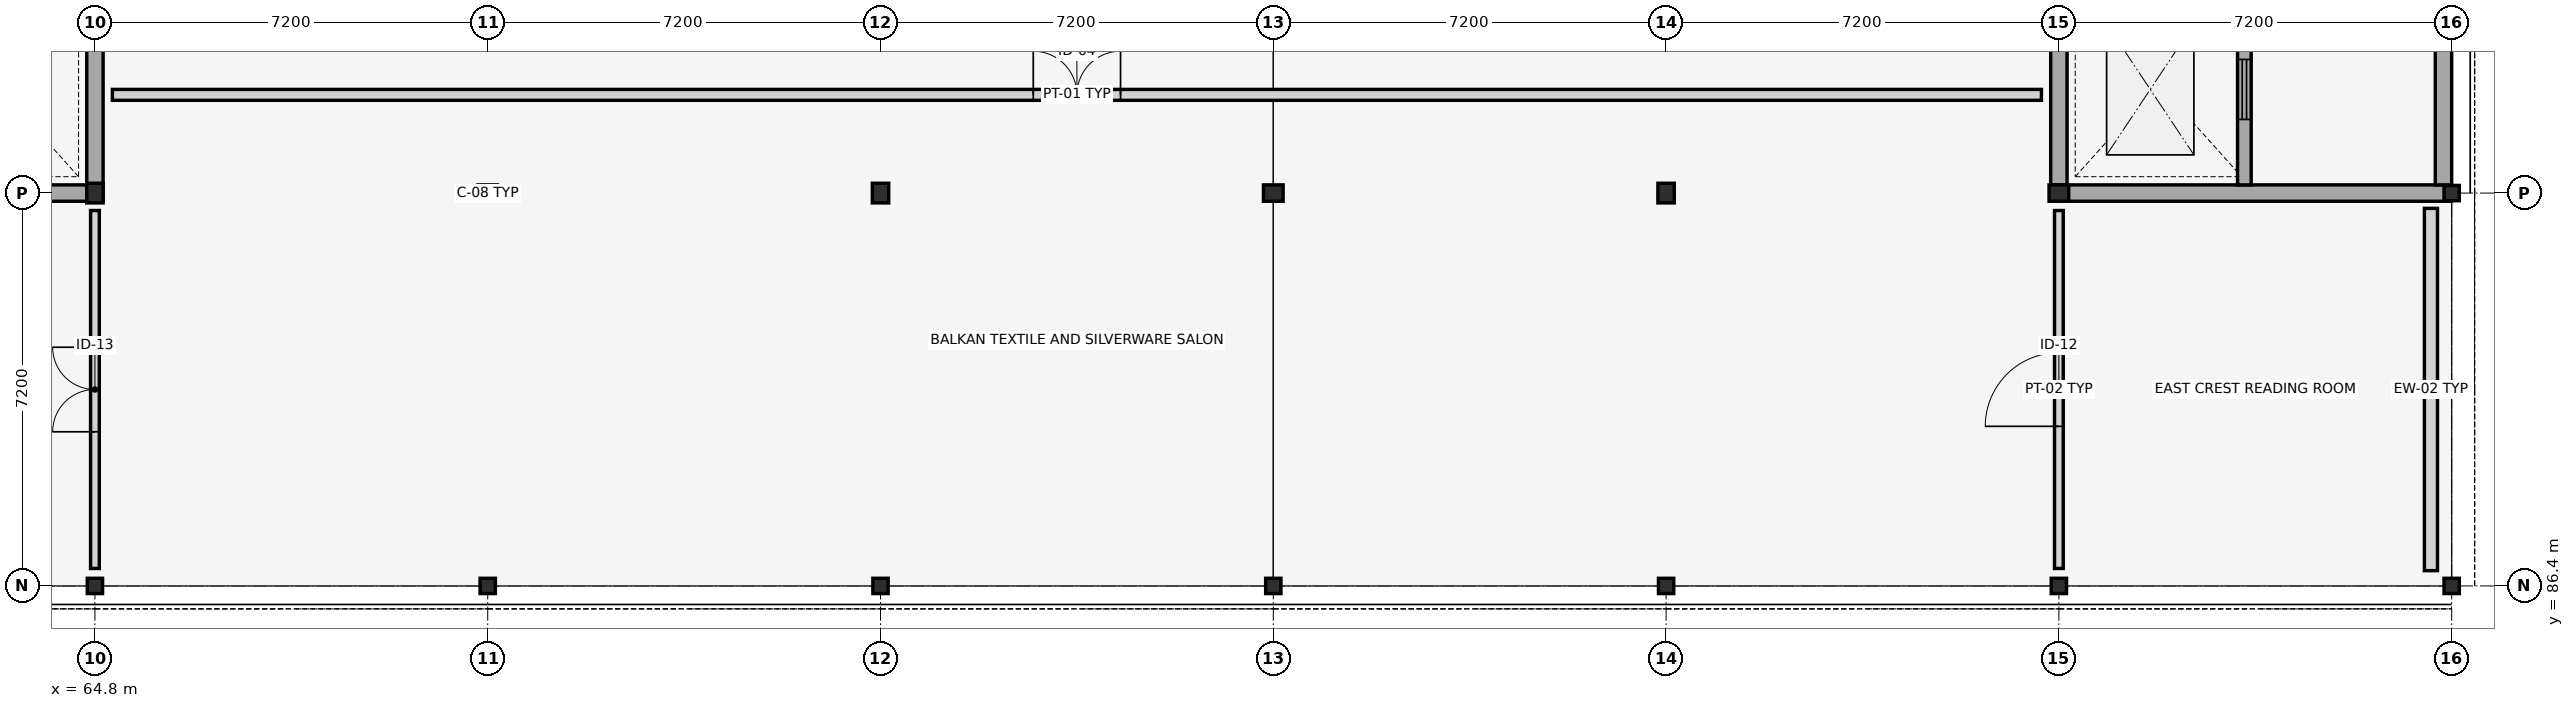
"""IFC4 building model, lengths in metres.
Left out: names, types, materials, properties, quantities, classifications, styles, units other than length and angle.
Written with IfcOpenShell. Run it as: python <this file> out.ifc"""

import sys

from ifc_helpers import new_model, si_unit, direction, frame, frame_2d, origin, origin_2d, place, context, subcontext, project, spatial, rectangle, i_section, extrude, element, fill, save


model = new_model("IFC4")
c1 = context("Model", 3, precision=1e-05, world=origin(), true_north=direction((0.0, 1.0)))
c2 = subcontext(c1, "Body", "Model", "MODEL_VIEW")
j1 = project(units=[si_unit("LENGTHUNIT", "METRE"), si_unit("PLANEANGLEUNIT", "RADIAN")], contexts=[c1])
p1 = place(None, origin())
s1 = spatial("IfcSite", under=j1, at=p1, CompositionType="ELEMENT")
p2 = place(p1, origin())
s2 = spatial("IfcBuilding", under=s1, at=p2, CompositionType="ELEMENT")
p3 = place(p2, frame((0.0, 0.0, 12.9)))
s3 = spatial("IfcBuildingStorey", under=s2, at=p3, CompositionType="ELEMENT", Elevation=12.9)
p4 = place(p3, frame((64.8, 86.4, 0.0), z_axis=(0.0, 0.0, 1.0), x_axis=(0.0, 1.0, 0.0)))
e1 = element("IfcColumn", 1, at=p4, inside=s3, PredefinedType="COLUMN", context=c2, shape_type="SweptSolid", body=[
    extrude(i_section(OverallWidth=0.28, OverallDepth=0.28, WebThickness=0.01, FlangeThickness=0.018, FilletRadius=0.024, at=origin_2d()), origin(), (0.0, 0.0, 1.0), 4.2),
])
p5 = place(p3, frame((64.8, 93.6, 0.0), z_axis=(0.0, 0.0, 1.0), x_axis=(1.0, 0.0, 0.0)))
e2 = element("IfcColumn", 2, at=p5, inside=s3, PredefinedType="COLUMN", context=c2, shape_type="SweptSolid", body=[
    extrude(i_section(OverallWidth=0.3, OverallDepth=0.36, WebThickness=0.012, FlangeThickness=0.022, FilletRadius=0.027, at=origin_2d()), origin(), (0.0, 0.0, 1.0), 4.2),
])
p6 = place(p3, frame((72.0, 86.4, 0.0), z_axis=(0.0, 0.0, 1.0), x_axis=(1.0, 0.0, 0.0)))
e3 = element("IfcColumn", 3, at=p6, inside=s3, PredefinedType="COLUMN", context=c2, shape_type="SweptSolid", body=[
    extrude(i_section(OverallWidth=0.28, OverallDepth=0.28, WebThickness=0.01, FlangeThickness=0.018, FilletRadius=0.024, at=origin_2d()), origin(), (0.0, 0.0, 1.0), 4.2),
])
p7 = place(p3, frame((72.0, 93.6, 0.0), z_axis=(0.0, 0.0, 1.0), x_axis=(0.0, 1.0, 0.0)))
e4 = element("IfcColumn", 4, at=p7, inside=s3, PredefinedType="COLUMN", context=c2, shape_type="SweptSolid", body=[
    extrude(i_section(OverallWidth=0.3, OverallDepth=0.36, WebThickness=0.012, FlangeThickness=0.022, FilletRadius=0.027, at=origin_2d()), origin(), (0.0, 0.0, 1.0), 4.2),
])
p8 = place(p3, frame((79.2, 86.4, 0.0), z_axis=(0.0, 0.0, 1.0), x_axis=(0.0, 1.0, 0.0)))
e5 = element("IfcColumn", 5, at=p8, inside=s3, PredefinedType="COLUMN", context=c2, shape_type="SweptSolid", body=[
    extrude(i_section(OverallWidth=0.28, OverallDepth=0.28, WebThickness=0.01, FlangeThickness=0.018, FilletRadius=0.024, at=origin_2d()), origin(), (0.0, 0.0, 1.0), 4.2),
])
p9 = place(p3, frame((79.2, 93.6, 0.0), z_axis=(0.0, 0.0, 1.0), x_axis=(1.0, 0.0, 0.0)))
e6 = element("IfcColumn", 6, at=p9, inside=s3, PredefinedType="COLUMN", context=c2, shape_type="SweptSolid", body=[
    extrude(i_section(OverallWidth=0.3, OverallDepth=0.36, WebThickness=0.012, FlangeThickness=0.022, FilletRadius=0.027, at=origin_2d()), origin(), (0.0, 0.0, 1.0), 4.2),
])
p10 = place(p3, frame((86.4, 86.4, 0.0), z_axis=(0.0, 0.0, 1.0), x_axis=(1.0, 0.0, 0.0)))
e7 = element("IfcColumn", 7, at=p10, inside=s3, PredefinedType="COLUMN", context=c2, shape_type="SweptSolid", body=[
    extrude(i_section(OverallWidth=0.28, OverallDepth=0.28, WebThickness=0.01, FlangeThickness=0.018, FilletRadius=0.024, at=origin_2d()), origin(), (0.0, 0.0, 1.0), 4.2),
])
p11 = place(p3, frame((86.4, 93.6, 0.0), z_axis=(0.0, 0.0, 1.0), x_axis=(0.0, 1.0, 0.0)))
e8 = element("IfcColumn", 8, at=p11, inside=s3, PredefinedType="COLUMN", context=c2, shape_type="SweptSolid", body=[
    extrude(i_section(OverallWidth=0.3, OverallDepth=0.36, WebThickness=0.012, FlangeThickness=0.022, FilletRadius=0.027, at=origin_2d()), origin(), (0.0, 0.0, 1.0), 4.2),
])
p12 = place(p3, frame((93.6, 86.4, 0.0), z_axis=(0.0, 0.0, 1.0), x_axis=(0.0, 1.0, 0.0)))
e9 = element("IfcColumn", 9, at=p12, inside=s3, PredefinedType="COLUMN", context=c2, shape_type="SweptSolid", body=[
    extrude(i_section(OverallWidth=0.28, OverallDepth=0.28, WebThickness=0.01, FlangeThickness=0.018, FilletRadius=0.024, at=origin_2d()), origin(), (0.0, 0.0, 1.0), 4.2),
])
p13 = place(p3, frame((93.6, 93.6, 0.0), z_axis=(0.0, 0.0, 1.0), x_axis=(1.0, 0.0, 0.0)))
e10 = element("IfcColumn", 10, at=p13, inside=s3, PredefinedType="COLUMN", context=c2, shape_type="SweptSolid", body=[
    extrude(i_section(OverallWidth=0.3, OverallDepth=0.36, WebThickness=0.012, FlangeThickness=0.022, FilletRadius=0.027, at=origin_2d()), origin(), (0.0, 0.0, 1.0), 4.2),
])
p14 = place(p3, frame((100.8, 86.4, 0.0), z_axis=(0.0, 0.0, 1.0), x_axis=(1.0, 0.0, 0.0)))
e11 = element("IfcColumn", 11, at=p14, inside=s3, PredefinedType="COLUMN", context=c2, shape_type="SweptSolid", body=[
    extrude(i_section(OverallWidth=0.28, OverallDepth=0.28, WebThickness=0.01, FlangeThickness=0.018, FilletRadius=0.024, at=origin_2d()), origin(), (0.0, 0.0, 1.0), 4.2),
])
p15 = place(p3, frame((100.8, 93.6, 0.0), z_axis=(0.0, 0.0, 1.0), x_axis=(0.0, 1.0, 0.0)))
e12 = element("IfcColumn", 12, at=p15, inside=s3, PredefinedType="COLUMN", context=c2, shape_type="SweptSolid", body=[
    extrude(i_section(OverallWidth=0.3, OverallDepth=0.36, WebThickness=0.012, FlangeThickness=0.022, FilletRadius=0.027, at=origin_2d()), origin(), (0.0, 0.0, 1.0), 4.2),
])
for number, where, z_axis, x_axis in (
    (13, (108.0, 86.4, 0.0), (0.0, 0.0, 1.0), (0.0, 1.0, 0.0)),
    (14, (108.0, 93.6, 0.0), (0.0, 0.0, 1.0), (1.0, 0.0, 0.0)),
):
    element("IfcColumn", number, at=place(p3, frame(where, z_axis=z_axis, x_axis=x_axis)), inside=s3, PredefinedType="COLUMN", context=c2, shape_type="SweptSolid", body=[
        extrude(i_section(OverallWidth=0.28, OverallDepth=0.28, WebThickness=0.01, FlangeThickness=0.018, FilletRadius=0.024, at=origin_2d()), origin(), (0.0, 0.0, 1.0), 4.2),
    ])
p16 = place(p3, frame((107.62, 86.68, 0.0), z_axis=(0.0, 0.0, 1.0), x_axis=(0.0, 1.0, 0.0)))
e15 = element("IfcWall", 15, at=p16, inside=s3, PredefinedType="STANDARD", context=c2, shape_type="SweptSolid", body=[
    extrude(rectangle(XDim=6.64, YDim=0.24, at=frame_2d((3.32, 0.0))), origin(), (0.0, 0.0, 1.0), 3.56),
])
p17 = place(p3, frame((57.6, 93.6, 0.0), z_axis=(0.0, 0.0, 1.0), x_axis=(1.0, 0.0, 0.0)))
e16 = element("IfcWall", 16, at=p17, inside=s3, PredefinedType="SHEAR", context=c2, shape_type="SweptSolid", body=[
    extrude(rectangle(XDim=7.35, YDim=0.3, at=frame_2d((3.675, 0.0))), origin(), (0.0, 0.0, 1.0), 3.96),
])
p18 = place(p3, frame((64.8, 93.75, 0.0), z_axis=(0.0, 0.0, 1.0), x_axis=(0.0, 1.0, 0.0)))
e17 = element("IfcWall", 17, at=p18, inside=s3, PredefinedType="SHEAR", context=c2, shape_type="SweptSolid", body=[
    extrude(rectangle(XDim=14.1, YDim=0.3, at=frame_2d((7.05, 0.0))), origin(), (0.0, 0.0, 1.0), 3.96),
])
p19 = place(p18, frame((3.55, 0.0, 0.0)))
e18 = element("IfcOpeningElement", 18, at=p19, cuts=e17, PredefinedType="OPENING", context=c2, shape_type="SweptSolid", body=[
    extrude(rectangle(XDim=1.3, YDim=2.2, at=frame_2d((0.65, 1.1))), frame((0.0, 0.16, 0.0), z_axis=(0.0, -1.0, 0.0), x_axis=(1.0, 0.0, 0.0)), (0.0, 0.0, 1.0), 0.32),
])
p20 = place(p18, frame((7.85, 0.0, 0.0)))
e19 = element("IfcOpeningElement", 19, at=p20, cuts=e17, PredefinedType="OPENING", context=c2, shape_type="SweptSolid", body=[
    extrude(rectangle(XDim=1.05, YDim=2.15, at=frame_2d((0.525, 1.075))), frame((0.0, 0.16, 0.0), z_axis=(0.0, -1.0, 0.0), x_axis=(1.0, 0.0, 0.0)), (0.0, 0.0, 1.0), 0.32),
])
p21 = place(p18, frame((10.55, 0.0, 0.0)))
e20 = element("IfcOpeningElement", 20, at=p21, cuts=e17, PredefinedType="OPENING", context=c2, shape_type="SweptSolid", body=[
    extrude(rectangle(XDim=1.0, YDim=2.15, at=frame_2d((0.5, 1.075))), frame((0.0, 0.16, 0.0), z_axis=(0.0, -1.0, 0.0), x_axis=(1.0, 0.0, 0.0)), (0.0, 0.0, 1.0), 0.32),
])
p22 = place(p3, frame((100.65, 93.6, 0.0), z_axis=(0.0, 0.0, 1.0), x_axis=(1.0, 0.0, 0.0)))
e21 = element("IfcWall", 21, at=p22, inside=s3, PredefinedType="SHEAR", context=c2, shape_type="SweptSolid", body=[
    extrude(rectangle(XDim=7.35, YDim=0.3, at=frame_2d((3.675, 0.0))), origin(), (0.0, 0.0, 1.0), 3.96),
])
p23 = place(p3, frame((107.85, 93.75, 0.0), z_axis=(0.0, 0.0, 1.0), x_axis=(0.0, 1.0, 0.0)))
e22 = element("IfcWall", 22, at=p23, inside=s3, PredefinedType="SHEAR", context=c2, shape_type="SweptSolid", body=[
    extrude(rectangle(XDim=14.1, YDim=0.3, at=frame_2d((7.05, 0.0))), origin(), (0.0, 0.0, 1.0), 3.96),
])
p24 = place(p3, frame((100.8, 93.75, 0.0), z_axis=(0.0, 0.0, 1.0), x_axis=(0.0, 1.0, 0.0)))
e23 = element("IfcWall", 23, at=p24, inside=s3, PredefinedType="SHEAR", context=c2, shape_type="SweptSolid", body=[
    extrude(rectangle(XDim=14.1, YDim=0.3, at=frame_2d((7.05, 0.0))), origin(), (0.0, 0.0, 1.0), 3.96),
])
p25 = place(p24, frame((3.55, 0.0, 0.0)))
e24 = element("IfcOpeningElement", 24, at=p25, cuts=e23, PredefinedType="OPENING", context=c2, shape_type="SweptSolid", body=[
    extrude(rectangle(XDim=1.3, YDim=2.2, at=frame_2d((0.65, 1.1))), frame((0.0, 0.16, 0.0), z_axis=(0.0, -1.0, 0.0), x_axis=(1.0, 0.0, 0.0)), (0.0, 0.0, 1.0), 0.32),
])
p26 = place(p24, frame((7.85, 0.0, 0.0)))
e25 = element("IfcOpeningElement", 25, at=p26, cuts=e23, PredefinedType="OPENING", context=c2, shape_type="SweptSolid", body=[
    extrude(rectangle(XDim=1.05, YDim=2.15, at=frame_2d((0.525, 1.075))), frame((0.0, 0.16, 0.0), z_axis=(0.0, -1.0, 0.0), x_axis=(1.0, 0.0, 0.0)), (0.0, 0.0, 1.0), 0.32),
])
p27 = place(p24, frame((10.55, 0.0, 0.0)))
e26 = element("IfcOpeningElement", 26, at=p27, cuts=e23, PredefinedType="OPENING", context=c2, shape_type="SweptSolid", body=[
    extrude(rectangle(XDim=1.0, YDim=2.15, at=frame_2d((0.5, 1.075))), frame((0.0, 0.16, 0.0), z_axis=(0.0, -1.0, 0.0), x_axis=(1.0, 0.0, 0.0)), (0.0, 0.0, 1.0), 0.32),
])
p28 = place(p3, frame((104.2, 93.75, 0.0), z_axis=(0.0, 0.0, 1.0), x_axis=(0.0, 1.0, 0.0)))
e27 = element("IfcWall", 27, at=p28, inside=s3, PredefinedType="SHEAR", context=c2, shape_type="SweptSolid", body=[
    extrude(rectangle(XDim=3.525, YDim=0.25, at=frame_2d((1.762, 0.0))), origin(), (0.0, 0.0, 1.0), 3.96),
])
p29 = place(p28, frame((1.2, 0.0, 0.0)))
e28 = element("IfcOpeningElement", 28, at=p29, cuts=e27, PredefinedType="OPENING", context=c2, shape_type="SweptSolid", body=[
    extrude(rectangle(XDim=1.1, YDim=2.15, at=frame_2d((0.55, 1.075))), frame((0.0, 0.135, 0.0), z_axis=(0.0, -1.0, 0.0), x_axis=(1.0, 0.0, 0.0)), (0.0, 0.0, 1.0), 0.27),
])
p30 = place(p3, frame((65.12, 95.4, 0.0), z_axis=(0.0, 0.0, 1.0), x_axis=(1.0, 0.0, 0.0)))
e29 = element("IfcWall", 29, at=p30, inside=s3, PredefinedType="PARTITIONING", context=c2, shape_type="SweptSolid", body=[
    extrude(rectangle(XDim=35.36, YDim=0.2, at=frame_2d((17.68, 0.0))), origin(), (0.0, 0.0, 1.0), 3.15),
])
p31 = place(p30, frame((16.88, 0.0, 0.0)))
e30 = element("IfcOpeningElement", 30, at=p31, cuts=e29, PredefinedType="OPENING", context=c2, shape_type="SweptSolid", body=[
    extrude(rectangle(XDim=1.6, YDim=2.35, at=frame_2d((0.8, 1.175))), frame((0.0, 0.11, 0.0), z_axis=(0.0, -1.0, 0.0), x_axis=(1.0, 0.0, 0.0)), (0.0, 0.0, 1.0), 0.22),
])
p32 = place(p3, frame((100.8, 86.72, 0.0), z_axis=(0.0, 0.0, 1.0), x_axis=(0.0, 1.0, 0.0)))
e31 = element("IfcWall", 31, at=p32, inside=s3, PredefinedType="PARTITIONING", context=c2, shape_type="SweptSolid", body=[
    extrude(rectangle(XDim=6.56, YDim=0.16, at=frame_2d((3.28, 0.0))), origin(), (0.0, 0.0, 1.0), 3.15),
])
p33 = place(p32, frame((2.605, 0.0, 0.0)))
e32 = element("IfcOpeningElement", 32, at=p33, cuts=e31, PredefinedType="OPENING", context=c2, shape_type="SweptSolid", body=[
    extrude(rectangle(XDim=1.35, YDim=2.35, at=frame_2d((0.675, 1.175))), frame((0.0, 0.09, 0.0), z_axis=(0.0, -1.0, 0.0), x_axis=(1.0, 0.0, 0.0)), (0.0, 0.0, 1.0), 0.18),
])
p34 = place(p3, frame((64.8, 86.72, 0.0), z_axis=(0.0, 0.0, 1.0), x_axis=(0.0, 1.0, 0.0)))
e33 = element("IfcWall", 33, at=p34, inside=s3, PredefinedType="PARTITIONING", context=c2, shape_type="SweptSolid", body=[
    extrude(rectangle(XDim=6.56, YDim=0.16, at=frame_2d((3.28, 0.0))), origin(), (0.0, 0.0, 1.0), 3.15),
])
p35 = place(p34, frame((2.505, 0.0, 0.0)))
e34 = element("IfcOpeningElement", 34, at=p35, cuts=e33, PredefinedType="OPENING", context=c2, shape_type="SweptSolid", body=[
    extrude(rectangle(XDim=1.55, YDim=2.4, at=frame_2d((0.775, 1.2))), frame((0.0, 0.09, 0.0), z_axis=(0.0, -1.0, 0.0), x_axis=(1.0, 0.0, 0.0)), (0.0, 0.0, 1.0), 0.18),
])
p36 = place(p29, origin())
e35 = element("IfcDoor", 35, at=p36, inside=s3, OperationType="SLIDING_TO_LEFT", PredefinedType="DOOR", context=c2, shape_type="SweptSolid", body=[
    extrude(rectangle(XDim=1.1, YDim=2.15, at=frame_2d((0.55, 1.075))), frame((0.0, 0.025, 0.0), z_axis=(0.0, -1.0, 0.0), x_axis=(1.0, 0.0, 0.0)), (0.0, 0.0, 1.0), 0.05),
])
fill(e28, e35)
p37 = place(p31, origin())
e36 = element("IfcDoor", 36, at=p37, inside=s3, OperationType="DOUBLE_DOOR_SINGLE_SWING", PredefinedType="DOOR", context=c2, shape_type="SweptSolid", body=[
    extrude(rectangle(XDim=1.6, YDim=2.35, at=frame_2d((0.8, 1.175))), frame((0.0, 0.025, 0.0), z_axis=(0.0, -1.0, 0.0), x_axis=(1.0, 0.0, 0.0)), (0.0, 0.0, 1.0), 0.05),
])
fill(e30, e36)
p38 = place(p33, origin())
e37 = element("IfcDoor", 37, at=p38, inside=s3, OperationType="SINGLE_SWING_LEFT", PredefinedType="DOOR", context=c2, shape_type="SweptSolid", body=[
    extrude(rectangle(XDim=1.35, YDim=2.35, at=frame_2d((0.675, 1.175))), frame((0.0, 0.025, 0.0), z_axis=(0.0, -1.0, 0.0), x_axis=(1.0, 0.0, 0.0)), (0.0, 0.0, 1.0), 0.05),
])
fill(e32, e37)
p39 = place(p35, origin())
e38 = element("IfcDoor", 38, at=p39, inside=s3, OperationType="DOUBLE_DOOR_SINGLE_SWING", PredefinedType="DOOR", context=c2, shape_type="SweptSolid", body=[
    extrude(rectangle(XDim=1.55, YDim=2.4, at=frame_2d((0.775, 1.2))), frame((0.0, 0.025, 0.0), z_axis=(0.0, -1.0, 0.0), x_axis=(1.0, 0.0, 0.0)), (0.0, 0.0, 1.0), 0.05),
])
fill(e34, e38)
save(model, sys.argv[1])
